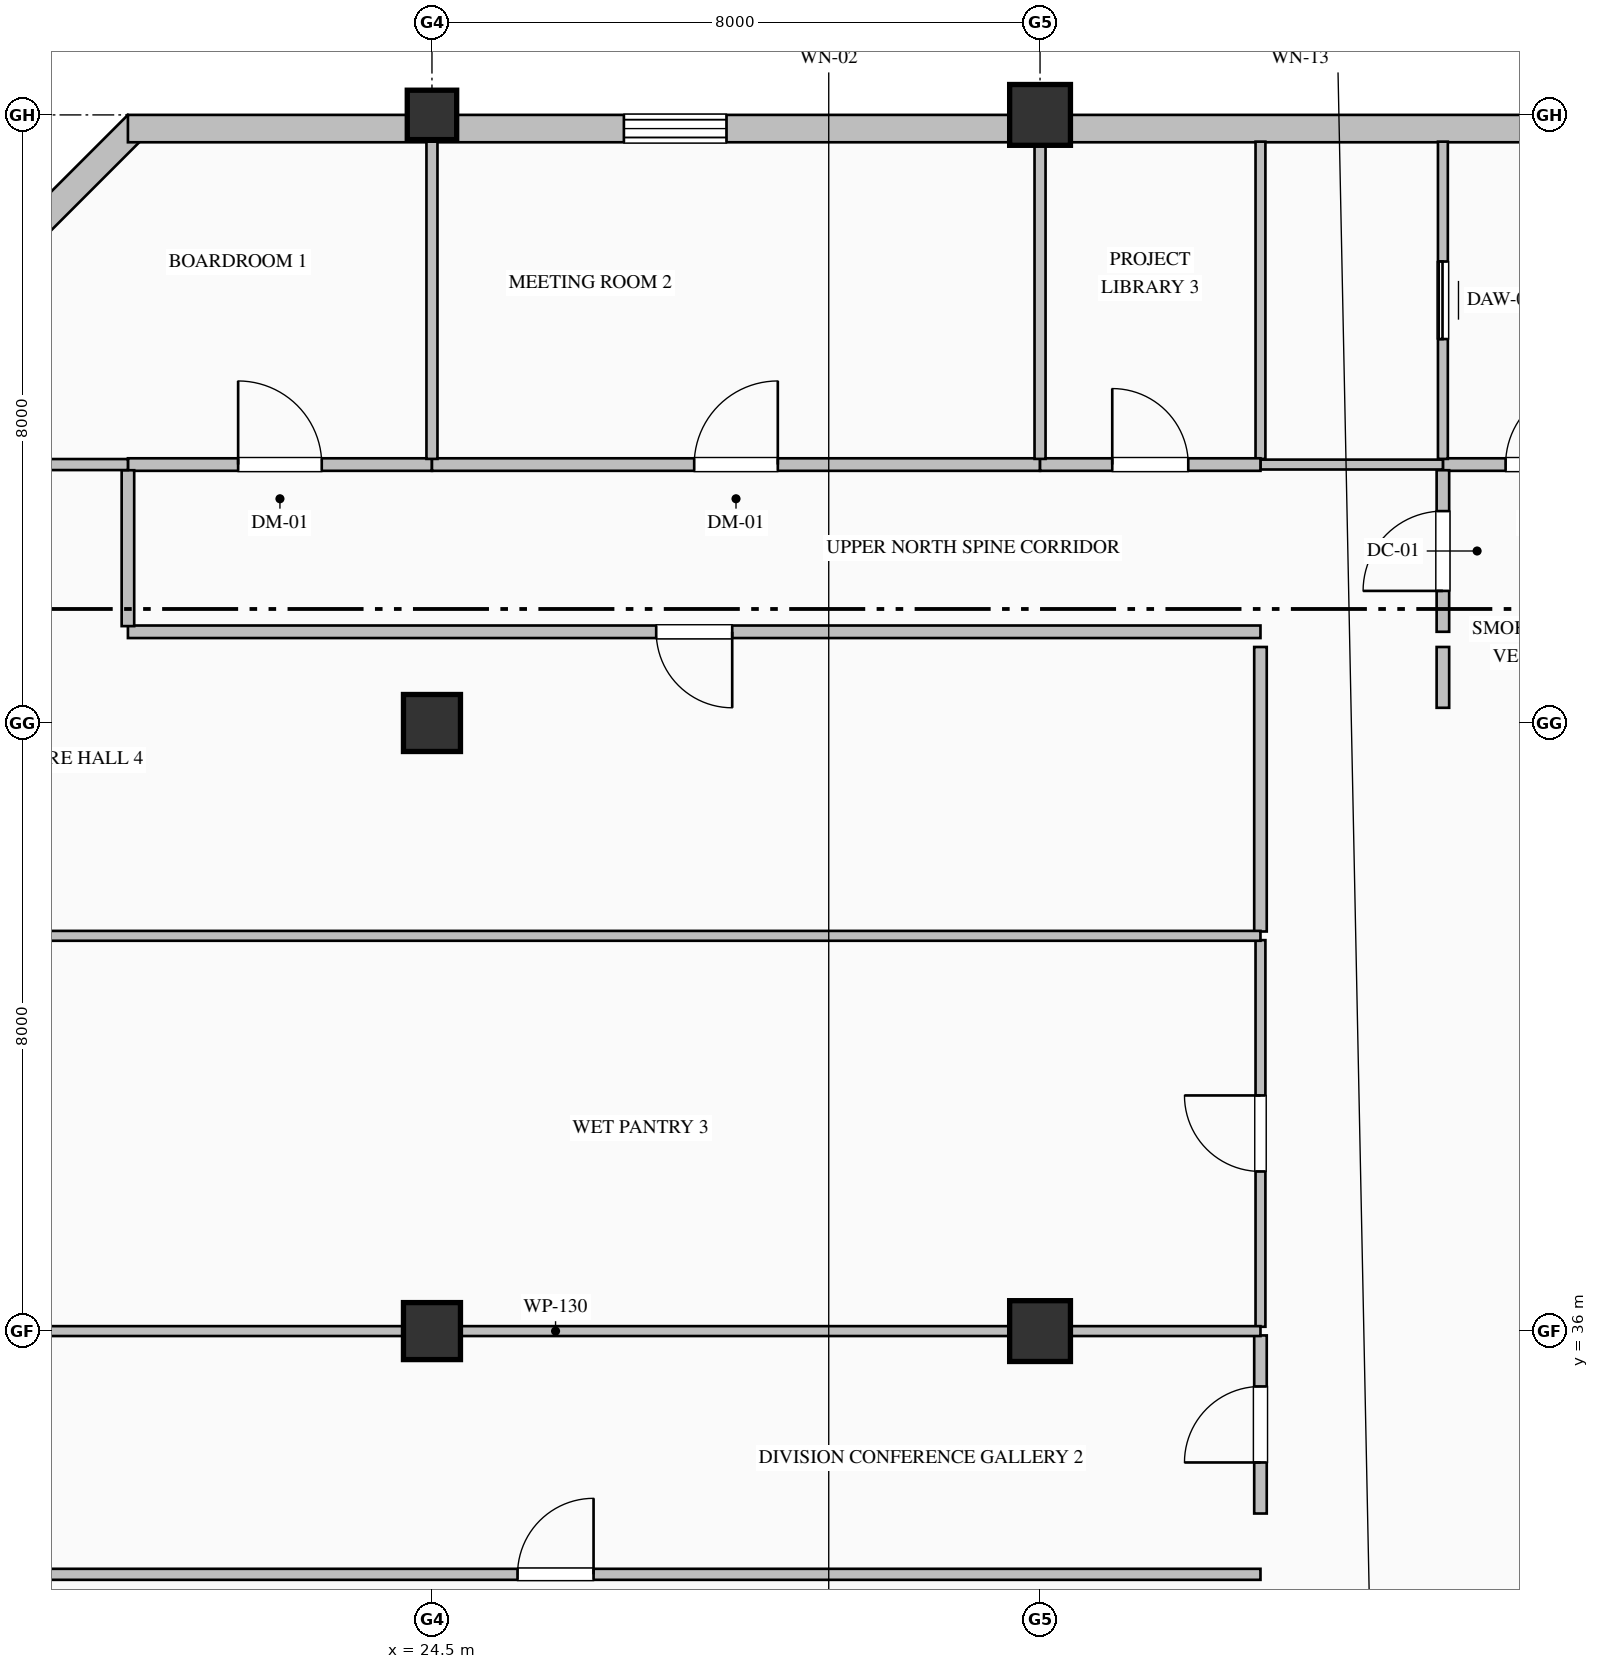
"""IFC4 building model, lengths in metres.
Left out: names, types, materials, properties, quantities, classifications, styles, units other than length and angle.
Written with IfcOpenShell. Run it as: python <this file> out.ifc"""

import sys

from ifc_helpers import new_model, si_unit, direction, frame, frame_2d, origin, origin_2d, place, context, subcontext, project, spatial, rectangle, hollow_rectangle, extrude, element, fill, save


model = new_model("IFC4")
c1 = context("Model", 3, precision=1e-05, world=origin(), true_north=direction((0.0, 1.0)))
c2 = subcontext(c1, "Body", "Model", "MODEL_VIEW")
j1 = project(units=[si_unit("LENGTHUNIT", "METRE"), si_unit("PLANEANGLEUNIT", "RADIAN")], contexts=[c1])
p1 = place(None, origin())
s1 = spatial("IfcSite", under=j1, at=p1, CompositionType="ELEMENT")
p2 = place(p1, origin())
s2 = spatial("IfcBuilding", under=s1, at=p2, CompositionType="ELEMENT")
p3 = place(p2, frame((0.0, 0.0, 307.2)))
s3 = spatial("IfcBuildingStorey", under=s2, at=p3, CompositionType="ELEMENT", Elevation=307.2)
for number, where, z_axis, x_axis in (
    (1, (24.5, 36.0, 0.0), (0.0, 0.0, 1.0), (1.0, 0.0, 0.0)),
    (2, (24.5, 44.0, 0.0), (0.0, 0.0, 1.0), (1.0, 0.0, 0.0)),
):
    element("IfcColumn", number, at=place(p3, frame(where, z_axis=z_axis, x_axis=x_axis)), inside=s3, PredefinedType="COLUMN", context=c2, shape_type="SweptSolid", body=[
        extrude(rectangle(XDim=0.75, YDim=0.75, at=origin_2d()), origin(), (0.0, 0.0, 1.0), 4.0),
    ])
p4 = place(p3, frame((24.5, 52.0, 0.0), z_axis=(0.0, 0.0, 1.0), x_axis=(1.0, 0.0, 0.0)))
e3 = element("IfcColumn", 3, at=p4, inside=s3, PredefinedType="COLUMN", context=c2, shape_type="SweptSolid", body=[
    extrude(hollow_rectangle(XDim=0.65, YDim=0.65, WallThickness=0.028, at=origin_2d()), origin(), (0.0, 0.0, 1.0), 4.0),
])
for number, where, z_axis, x_axis in (
    (4, (32.5, 36.0, 0.0), (0.0, 0.0, 1.0), (1.0, 0.0, 0.0)),
    (5, (32.5, 52.0, 0.0), (0.0, 0.0, 1.0), (1.0, 0.0, 0.0)),
):
    element("IfcColumn", number, at=place(p3, frame(where, z_axis=z_axis, x_axis=x_axis)), inside=s3, PredefinedType="COLUMN", context=c2, shape_type="SweptSolid", body=[
        extrude(hollow_rectangle(XDim=0.8, YDim=0.8, WallThickness=0.032, at=origin_2d()), origin(), (0.0, 0.0, 1.0), 4.0),
    ])
p5 = place(p3, frame((16.627, 47.873, 0.0), z_axis=(0.0, 0.0, 1.0), x_axis=(0.707106781187, 0.707106781187, 0.0)))
e6 = element("IfcWall", 6, at=p5, inside=s3, PredefinedType="SOLIDWALL", context=c2, shape_type="SweptSolid", body=[
    extrude(rectangle(XDim=5.657, YDim=0.36, at=frame_2d((2.828, 0.0))), origin(), (0.0, 0.0, 1.0), 3.785),
])
p6 = place(p3, frame((20.5, 51.82, 0.0), z_axis=(0.0, 0.0, 1.0), x_axis=(1.0, 0.0, 0.0)))
e7 = element("IfcWall", 7, at=p6, inside=s3, PredefinedType="SOLIDWALL", context=c2, shape_type="SweptSolid", body=[
    extrude(rectangle(XDim=20.02, YDim=0.36, at=frame_2d((10.01, 0.0))), origin(), (0.0, 0.0, 1.0), 3.335),
])
p7 = place(p6, frame((6.525, 0.0, 0.9)))
e8 = element("IfcOpeningElement", 8, at=p7, cuts=e7, PredefinedType="OPENING", context=c2, shape_type="SweptSolid", body=[
    extrude(rectangle(XDim=1.35, YDim=1.85, at=frame_2d((0.675, 0.925))), frame((0.0, 0.19, 0.0), z_axis=(0.0, -1.0, 0.0), x_axis=(1.0, 0.0, 0.0)), (0.0, 0.0, 1.0), 0.38),
])
p8 = place(p3, frame((37.8, 47.4, 0.0), z_axis=(0.0, 0.0, 1.0), x_axis=(1.0, 0.0, 0.0)))
e9 = element("IfcWall", 9, at=p8, inside=s3, PredefinedType="PARTITIONING", context=c2, shape_type="SweptSolid", body=[
    extrude(rectangle(XDim=2.7, YDim=0.165, at=frame_2d((1.35, 0.0))), origin(), (0.0, 0.0, 1.0), 3.785),
])
p9 = place(p8, frame((0.825, 0.0, 0.0)))
e10 = element("IfcOpeningElement", 10, at=p9, cuts=e9, PredefinedType="OPENING", context=c2, shape_type="SweptSolid", body=[
    extrude(rectangle(XDim=1.05, YDim=2.15, at=frame_2d((0.525, 1.075))), frame((0.0, 0.093, 0.0), z_axis=(0.0, -1.0, 0.0), x_axis=(1.0, 0.0, 0.0)), (0.0, 0.0, 1.0), 0.185),
])
p10 = place(p3, frame((37.8, 45.2, 0.0), z_axis=(0.0, 0.0, 1.0), x_axis=(0.0, 1.0, 0.0)))
e11 = element("IfcWall", 11, at=p10, inside=s3, PredefinedType="PARTITIONING", context=c2, shape_type="SweptSolid", body=[
    extrude(rectangle(XDim=2.125, YDim=0.165, at=frame_2d((1.063, 0.0))), origin(), (0.0, 0.0, 1.0), 3.785),
])
p11 = place(p10, frame((0.538, 0.0, 0.0)))
e12 = element("IfcOpeningElement", 12, at=p11, cuts=e11, PredefinedType="OPENING", context=c2, shape_type="SweptSolid", body=[
    extrude(rectangle(XDim=1.05, YDim=2.15, at=frame_2d((0.525, 1.075))), frame((0.0, 0.093, 0.0), z_axis=(0.0, -1.0, 0.0), x_axis=(1.0, 0.0, 0.0)), (0.0, 0.0, 1.0), 0.185),
])
p12 = place(p3, frame((37.8, 44.2, 0.0), z_axis=(0.0, 0.0, 1.0), x_axis=(0.0, 1.0, 0.0)))
e13 = element("IfcWall", 13, at=p12, inside=s3, PredefinedType="PARTITIONING", context=c2, shape_type="SweptSolid", body=[
    extrude(rectangle(XDim=0.8, YDim=0.165, at=frame_2d((0.4, 0.0))), origin(), (0.0, 0.0, 1.0), 3.785),
])
p13 = place(p3, frame((37.8, 47.475, 0.0), z_axis=(0.0, 0.0, 1.0), x_axis=(0.0, 1.0, 0.0)))
e14 = element("IfcWall", 14, at=p13, inside=s3, PredefinedType="PARTITIONING", context=c2, shape_type="SweptSolid", body=[
    extrude(rectangle(XDim=4.173, YDim=0.13, at=frame_2d((2.087, 0.0))), origin(), (0.0, 0.0, 1.0), 3.785),
])
p14 = place(p13, frame((1.577, 0.0, 0.0)))
e15 = element("IfcOpeningElement", 15, at=p14, cuts=e14, PredefinedType="OPENING", context=c2, shape_type="SweptSolid", body=[
    extrude(rectangle(XDim=1.02, YDim=2.15, at=frame_2d((0.51, 1.075))), frame((0.0, 0.075, 0.0), z_axis=(0.0, -1.0, 0.0), x_axis=(1.0, 0.0, 0.0)), (0.0, 0.0, 1.0), 0.15),
])
p15 = place(p3, frame((37.8, 47.4, 0.0), z_axis=(0.0, 0.0, 1.0), x_axis=(-1.0, 0.0, 0.0)))
e16 = element("IfcWall", 16, at=p15, inside=s3, PredefinedType="PARTITIONING", context=c2, shape_type="SweptSolid", body=[
    extrude(rectangle(XDim=2.4, YDim=0.13, at=frame_2d((1.2, 0.0))), origin(), (0.0, 0.0, 1.0), 3.785),
])
p16 = place(p3, frame((35.4, 47.475, 0.0), z_axis=(0.0, 0.0, 1.0), x_axis=(0.0, 1.0, 0.0)))
e17 = element("IfcWall", 17, at=p16, inside=s3, PredefinedType="PARTITIONING", context=c2, shape_type="SweptSolid", body=[
    extrude(rectangle(XDim=4.173, YDim=0.13, at=frame_2d((2.087, 0.0))), origin(), (0.0, 0.0, 1.0), 3.785),
])
p17 = place(p3, frame((20.5, 47.4, 0.0), z_axis=(0.0, 0.0, 1.0), x_axis=(1.0, 0.0, 0.0)))
e18 = element("IfcWall", 18, at=p17, inside=s3, PredefinedType="PARTITIONING", context=c2, shape_type="SweptSolid", body=[
    extrude(rectangle(XDim=4.0, YDim=0.165, at=frame_2d((2.0, 0.0))), origin(), (0.0, 0.0, 1.0), 3.785),
])
p18 = place(p17, frame((1.45, 0.0, 0.0)))
e19 = element("IfcOpeningElement", 19, at=p18, cuts=e18, PredefinedType="OPENING", context=c2, shape_type="SweptSolid", body=[
    extrude(rectangle(XDim=1.1, YDim=2.2, at=frame_2d((0.55, 1.1))), frame((0.0, 0.093, 0.0), z_axis=(0.0, -1.0, 0.0), x_axis=(1.0, 0.0, 0.0)), (0.0, 0.0, 1.0), 0.185),
])
p19 = place(p3, frame((24.5, 47.4, 0.0), z_axis=(0.0, 0.0, 1.0), x_axis=(1.0, 0.0, 0.0)))
e20 = element("IfcWall", 20, at=p19, inside=s3, PredefinedType="PARTITIONING", context=c2, shape_type="SweptSolid", body=[
    extrude(rectangle(XDim=8.0, YDim=0.165, at=frame_2d((4.0, 0.0))), origin(), (0.0, 0.0, 1.0), 3.785),
])
p20 = place(p19, frame((3.45, 0.0, 0.0)))
e21 = element("IfcOpeningElement", 21, at=p20, cuts=e20, PredefinedType="OPENING", context=c2, shape_type="SweptSolid", body=[
    extrude(rectangle(XDim=1.1, YDim=2.2, at=frame_2d((0.55, 1.1))), frame((0.0, 0.093, 0.0), z_axis=(0.0, -1.0, 0.0), x_axis=(1.0, 0.0, 0.0)), (0.0, 0.0, 1.0), 0.185),
])
p21 = place(p3, frame((32.5, 47.4, 0.0), z_axis=(0.0, 0.0, 1.0), x_axis=(1.0, 0.0, 0.0)))
e22 = element("IfcWall", 22, at=p21, inside=s3, PredefinedType="PARTITIONING", context=c2, shape_type="SweptSolid", body=[
    extrude(rectangle(XDim=2.9, YDim=0.165, at=frame_2d((1.45, 0.0))), origin(), (0.0, 0.0, 1.0), 3.785),
])
p22 = place(p21, frame((0.95, 0.0, 0.0)))
e23 = element("IfcOpeningElement", 23, at=p22, cuts=e22, PredefinedType="OPENING", context=c2, shape_type="SweptSolid", body=[
    extrude(rectangle(XDim=1.0, YDim=2.15, at=frame_2d((0.5, 1.075))), frame((0.0, 0.093, 0.0), z_axis=(0.0, -1.0, 0.0), x_axis=(1.0, 0.0, 0.0)), (0.0, 0.0, 1.0), 0.185),
])
p23 = place(p3, frame((35.4, 45.2, 0.0), z_axis=(0.0, 0.0, 1.0), x_axis=(-1.0, 0.0, 0.0)))
e24 = element("IfcWall", 24, at=p23, inside=s3, PredefinedType="PARTITIONING", context=c2, shape_type="SweptSolid", body=[
    extrude(rectangle(XDim=14.9, YDim=0.165, at=frame_2d((7.45, 0.0))), origin(), (0.0, 0.0, 1.0), 3.785),
])
p24 = place(p23, frame((6.95, 0.0, 0.0)))
e25 = element("IfcOpeningElement", 25, at=p24, cuts=e24, PredefinedType="OPENING", context=c2, shape_type="SweptSolid", body=[
    extrude(rectangle(XDim=1.0, YDim=2.15, at=frame_2d((0.5, 1.075))), frame((0.0, 0.093, 0.0), z_axis=(0.0, -1.0, 0.0), x_axis=(1.0, 0.0, 0.0)), (0.0, 0.0, 1.0), 0.185),
])
p25 = place(p3, frame((20.5, 45.274, 0.0), z_axis=(0.0, 0.0, 1.0), x_axis=(0.0, 1.0, 0.0)))
e26 = element("IfcWall", 26, at=p25, inside=s3, PredefinedType="PARTITIONING", context=c2, shape_type="SweptSolid", body=[
    extrude(rectangle(XDim=2.051, YDim=0.165, at=frame_2d((1.025, 0.0))), origin(), (0.0, 0.0, 1.0), 3.785),
])
p26 = place(p3, frame((35.4, 33.6, 0.0), z_axis=(0.0, 0.0, 1.0), x_axis=(0.0, 1.0, 0.0)))
e27 = element("IfcWall", 27, at=p26, inside=s3, PredefinedType="PARTITIONING", context=c2, shape_type="SweptSolid", body=[
    extrude(rectangle(XDim=2.343, YDim=0.165, at=frame_2d((1.171, 0.0))), origin(), (0.0, 0.0, 1.0), 3.785),
])
p27 = place(p26, frame((0.671, 0.0, 0.0)))
e28 = element("IfcOpeningElement", 28, at=p27, cuts=e27, PredefinedType="OPENING", context=c2, shape_type="SweptSolid", body=[
    extrude(rectangle(XDim=1.0, YDim=2.15, at=frame_2d((0.5, 1.075))), frame((0.0, 0.093, 0.0), z_axis=(0.0, -1.0, 0.0), x_axis=(1.0, 0.0, 0.0)), (0.0, 0.0, 1.0), 0.185),
])
p28 = place(p3, frame((35.4, 36.057, 0.0), z_axis=(0.0, 0.0, 1.0), x_axis=(0.0, 1.0, 0.0)))
e29 = element("IfcWall", 29, at=p28, inside=s3, PredefinedType="PARTITIONING", context=c2, shape_type="SweptSolid", body=[
    extrude(rectangle(XDim=5.086, YDim=0.13, at=frame_2d((2.543, 0.0))), origin(), (0.0, 0.0, 1.0), 3.785),
])
p29 = place(p28, frame((2.043, 0.0, 0.0)))
e30 = element("IfcOpeningElement", 30, at=p29, cuts=e29, PredefinedType="OPENING", context=c2, shape_type="SweptSolid", body=[
    extrude(rectangle(XDim=1.0, YDim=2.15, at=frame_2d((0.5, 1.075))), frame((0.0, 0.075, 0.0), z_axis=(0.0, -1.0, 0.0), x_axis=(1.0, 0.0, 0.0)), (0.0, 0.0, 1.0), 0.15),
])
p30 = place(p3, frame((35.4, 41.257, 0.0), z_axis=(0.0, 0.0, 1.0), x_axis=(0.0, 1.0, 0.0)))
e31 = element("IfcWall", 31, at=p30, inside=s3, PredefinedType="PARTITIONING", context=c2, shape_type="SweptSolid", body=[
    extrude(rectangle(XDim=3.743, YDim=0.165, at=frame_2d((1.872, 0.0))), origin(), (0.0, 0.0, 1.0), 3.785),
])
p31 = place(p3, frame((24.5, 51.648, 0.0), z_axis=(0.0, 0.0, 1.0), x_axis=(0.0, -1.0, 0.0)))
e32 = element("IfcWall", 32, at=p31, inside=s3, PredefinedType="PARTITIONING", context=c2, shape_type="SweptSolid", body=[
    extrude(rectangle(XDim=4.173, YDim=0.145, at=frame_2d((2.087, 0.0))), origin(), (0.0, 0.0, 1.0), 3.177),
])
p32 = place(p3, frame((20.5, 47.4, 0.0), z_axis=(0.0, 0.0, 1.0), x_axis=(-1.0, 0.0, 0.0)))
e33 = element("IfcWall", 33, at=p32, inside=s3, PredefinedType="PARTITIONING", context=c2, shape_type="SweptSolid", body=[
    extrude(rectangle(XDim=3.648, YDim=0.145, at=frame_2d((1.824, 0.0))), origin(), (0.0, 0.0, 1.0), 3.785),
])
p33 = place(p3, frame((32.5, 51.648, 0.0), z_axis=(0.0, 0.0, 1.0), x_axis=(0.0, -1.0, 0.0)))
e34 = element("IfcWall", 34, at=p33, inside=s3, PredefinedType="PARTITIONING", context=c2, shape_type="SweptSolid", body=[
    extrude(rectangle(XDim=4.173, YDim=0.145, at=frame_2d((2.087, 0.0))), origin(), (0.0, 0.0, 1.0), 3.785),
])
p34 = place(p3, frame((16.852, 32.8, 0.0), z_axis=(0.0, 0.0, 1.0), x_axis=(1.0, 0.0, 0.0)))
e35 = element("IfcWall", 35, at=p34, inside=s3, PredefinedType="PARTITIONING", context=c2, shape_type="SweptSolid", body=[
    extrude(rectangle(XDim=18.548, YDim=0.145, at=frame_2d((9.274, 0.0))), origin(), (0.0, 0.0, 1.0), 3.785),
])
p35 = place(p34, frame((8.774, 0.0, 0.0)))
e36 = element("IfcOpeningElement", 36, at=p35, cuts=e35, PredefinedType="OPENING", context=c2, shape_type="SweptSolid", body=[
    extrude(rectangle(XDim=1.0, YDim=2.15, at=frame_2d((0.5, 1.075))), frame((0.0, 0.083, 0.0), z_axis=(0.0, -1.0, 0.0), x_axis=(1.0, 0.0, 0.0)), (0.0, 0.0, 1.0), 0.165),
])
p36 = place(p3, frame((16.852, 36.0, 0.0), z_axis=(0.0, 0.0, 1.0), x_axis=(1.0, 0.0, 0.0)))
e37 = element("IfcWall", 37, at=p36, inside=s3, PredefinedType="PARTITIONING", context=c2, shape_type="SweptSolid", body=[
    extrude(rectangle(XDim=18.548, YDim=0.13, at=frame_2d((9.274, 0.0))), origin(), (0.0, 0.0, 1.0), 3.177),
])
p37 = place(p3, frame((16.852, 41.2, 0.0), z_axis=(0.0, 0.0, 1.0), x_axis=(1.0, 0.0, 0.0)))
e38 = element("IfcWall", 38, at=p37, inside=s3, PredefinedType="PARTITIONING", context=c2, shape_type="SweptSolid", body=[
    extrude(rectangle(XDim=18.548, YDim=0.13, at=frame_2d((9.274, 0.0))), origin(), (0.0, 0.0, 1.0), 3.785),
])
p38 = place(p7, origin())
e39 = element("IfcWindow", 39, at=p38, inside=s3, PartitioningType="DOUBLE_PANEL_VERTICAL", PredefinedType="WINDOW", context=c2, shape_type="SweptSolid", body=[
    extrude(rectangle(XDim=1.35, YDim=1.85, at=frame_2d((0.675, 0.925))), frame((0.0, 0.15, 0.0), z_axis=(0.0, -1.0, 0.0), x_axis=(1.0, 0.0, 0.0)), (0.0, 0.0, 1.0), 0.06),
])
fill(e8, e39)
p39 = place(p9, origin())
e40 = element("IfcDoor", 40, at=p39, inside=s3, OperationType="SINGLE_SWING_RIGHT", PredefinedType="DOOR", context=c2, shape_type="SweptSolid", body=[
    extrude(rectangle(XDim=1.05, YDim=2.15, at=frame_2d((0.525, 1.075))), frame((0.0, 0.025, 0.0), z_axis=(0.0, -1.0, 0.0), x_axis=(1.0, 0.0, 0.0)), (0.0, 0.0, 1.0), 0.05),
])
fill(e10, e40)
p40 = place(p11, origin())
e41 = element("IfcDoor", 41, at=p40, inside=s3, OperationType="SINGLE_SWING_LEFT", PredefinedType="DOOR", context=c2, shape_type="SweptSolid", body=[
    extrude(rectangle(XDim=1.05, YDim=2.15, at=frame_2d((0.525, 1.075))), frame((0.0, 0.025, 0.0), z_axis=(0.0, -1.0, 0.0), x_axis=(1.0, 0.0, 0.0)), (0.0, 0.0, 1.0), 0.05),
])
fill(e12, e41)
p41 = place(p14, origin())
e42 = element("IfcDoor", 42, at=p41, inside=s3, OperationType="SLIDING_TO_LEFT", PredefinedType="DOOR", context=c2, shape_type="SweptSolid", body=[
    extrude(rectangle(XDim=1.02, YDim=2.15, at=frame_2d((0.51, 1.075))), frame((0.0, 0.025, 0.0), z_axis=(0.0, -1.0, 0.0), x_axis=(1.0, 0.0, 0.0)), (0.0, 0.0, 1.0), 0.05),
])
fill(e15, e42)
p42 = place(p18, origin())
e43 = element("IfcDoor", 43, at=p42, inside=s3, OperationType="SINGLE_SWING_LEFT", PredefinedType="DOOR", context=c2, shape_type="SweptSolid", body=[
    extrude(rectangle(XDim=1.1, YDim=2.2, at=frame_2d((0.55, 1.1))), frame((0.0, 0.025, 0.0), z_axis=(0.0, -1.0, 0.0), x_axis=(1.0, 0.0, 0.0)), (0.0, 0.0, 1.0), 0.05),
])
fill(e19, e43)
p43 = place(p20, origin())
e44 = element("IfcDoor", 44, at=p43, inside=s3, OperationType="SINGLE_SWING_RIGHT", PredefinedType="DOOR", context=c2, shape_type="SweptSolid", body=[
    extrude(rectangle(XDim=1.1, YDim=2.2, at=frame_2d((0.55, 1.1))), frame((0.0, 0.025, 0.0), z_axis=(0.0, -1.0, 0.0), x_axis=(1.0, 0.0, 0.0)), (0.0, 0.0, 1.0), 0.05),
])
fill(e21, e44)
p44 = place(p22, origin())
e45 = element("IfcDoor", 45, at=p44, inside=s3, OperationType="SINGLE_SWING_LEFT", PredefinedType="DOOR", context=c2, shape_type="SweptSolid", body=[
    extrude(rectangle(XDim=1.0, YDim=2.15, at=frame_2d((0.5, 1.075))), frame((0.0, 0.025, 0.0), z_axis=(0.0, -1.0, 0.0), x_axis=(1.0, 0.0, 0.0)), (0.0, 0.0, 1.0), 0.05),
])
fill(e23, e45)
p45 = place(p35, origin())
e46 = element("IfcDoor", 46, at=p45, inside=s3, OperationType="SINGLE_SWING_RIGHT", PredefinedType="DOOR", context=c2, shape_type="SweptSolid", body=[
    extrude(rectangle(XDim=1.0, YDim=2.15, at=frame_2d((0.5, 1.075))), frame((0.0, 0.025, 0.0), z_axis=(0.0, -1.0, 0.0), x_axis=(1.0, 0.0, 0.0)), (0.0, 0.0, 1.0), 0.05),
])
fill(e36, e46)
p46 = place(p27, origin())
e47 = element("IfcDoor", 47, at=p46, inside=s3, OperationType="SINGLE_SWING_LEFT", PredefinedType="DOOR", context=c2, shape_type="SweptSolid", body=[
    extrude(rectangle(XDim=1.0, YDim=2.15, at=frame_2d((0.5, 1.075))), frame((0.0, 0.025, 0.0), z_axis=(0.0, -1.0, 0.0), x_axis=(1.0, 0.0, 0.0)), (0.0, 0.0, 1.0), 0.05),
])
fill(e28, e47)
p47 = place(p29, origin())
e48 = element("IfcDoor", 48, at=p47, inside=s3, OperationType="SINGLE_SWING_RIGHT", PredefinedType="DOOR", context=c2, shape_type="SweptSolid", body=[
    extrude(rectangle(XDim=1.0, YDim=2.15, at=frame_2d((0.5, 1.075))), frame((0.0, 0.025, 0.0), z_axis=(0.0, -1.0, 0.0), x_axis=(1.0, 0.0, 0.0)), (0.0, 0.0, 1.0), 0.05),
])
fill(e30, e48)
p48 = place(p24, origin())
e49 = element("IfcDoor", 49, at=p48, inside=s3, OperationType="SINGLE_SWING_LEFT", PredefinedType="DOOR", context=c2, shape_type="SweptSolid", body=[
    extrude(rectangle(XDim=1.0, YDim=2.15, at=frame_2d((0.5, 1.075))), frame((0.0, 0.025, 0.0), z_axis=(0.0, -1.0, 0.0), x_axis=(1.0, 0.0, 0.0)), (0.0, 0.0, 1.0), 0.05),
])
fill(e25, e49)
save(model, sys.argv[1])
